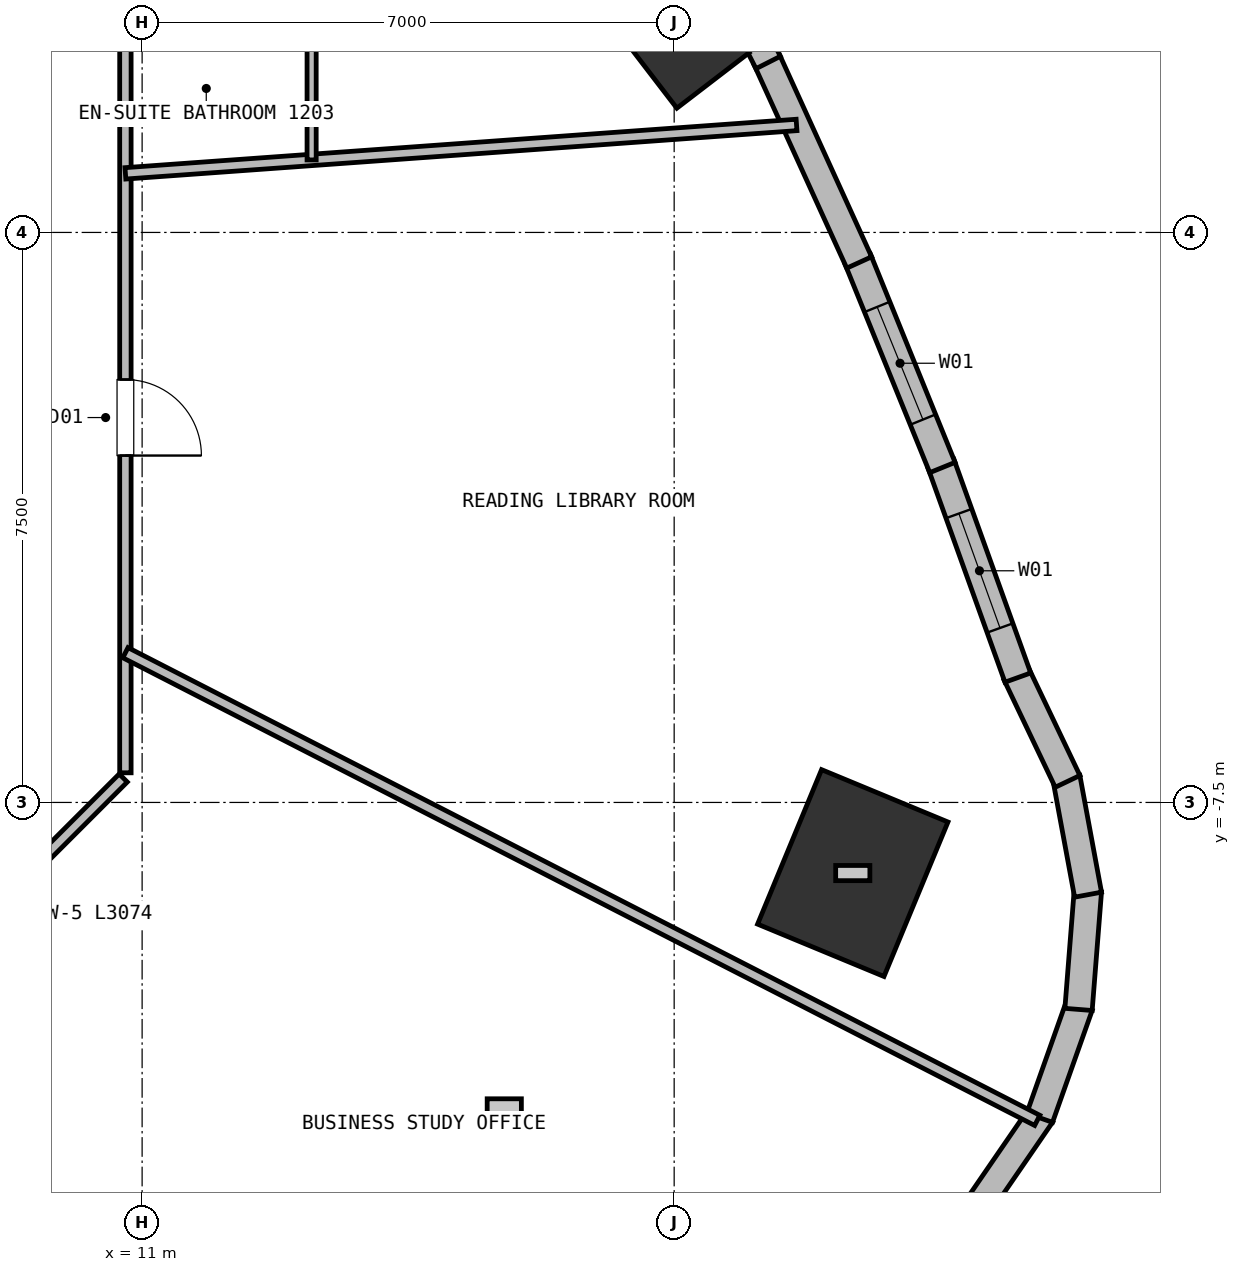
"""IFC4 building model, lengths in metres.
Left out: names, types, materials, properties, quantities, classifications, styles, units other than length and angle.
Written with IfcOpenShell. Run it as: python <this file> out.ifc"""

import sys

from ifc_helpers import new_model, si_unit, direction, frame, frame_2d, origin, origin_2d, place, context, subcontext, project, spatial, rectangle, extrude, element, fill, save


model = new_model("IFC4")
c1 = context("Model", 3, precision=1e-05, world=origin(), true_north=direction((0.0, 1.0)))
c2 = subcontext(c1, "Body", "Model", "MODEL_VIEW")
j1 = project(units=[si_unit("LENGTHUNIT", "METRE"), si_unit("PLANEANGLEUNIT", "RADIAN")], contexts=[c1])
p1 = place(None, origin())
s1 = spatial("IfcSite", under=j1, at=p1, CompositionType="ELEMENT")
p2 = place(p1, origin())
s2 = spatial("IfcBuilding", under=s1, at=p2, CompositionType="ELEMENT")
p3 = place(p2, frame((0.0, 0.0, 41.75)))
s3 = spatial("IfcBuildingStorey", under=s2, at=p3, CompositionType="ELEMENT", Elevation=41.75)
p4 = place(p3, frame((20.35, -8.429, 0.0), z_axis=(0.0, 0.0, 1.0), x_axis=(-0.923879532511, 0.382683432365, 0.0)))
e1 = element("IfcColumn", 1, at=p4, inside=s3, PredefinedType="COLUMN", context=c2, shape_type="SweptSolid", body=[
    extrude(rectangle(XDim=1.8, YDim=2.2, at=origin_2d()), origin(), (0.0, 0.0, 1.0), 3.75),
])
p5 = place(p3, frame((18.207, 2.397, 0.0), z_axis=(0.0, 0.0, 1.0), x_axis=(-0.608761429009, 0.793353340291, 0.0)))
e2 = element("IfcColumn", 2, at=p5, inside=s3, PredefinedType="COLUMN", context=c2, shape_type="SweptSolid", body=[
    extrude(rectangle(XDim=1.0, YDim=1.2, at=origin_2d()), origin(), (0.0, 0.0, 1.0), 3.75),
])
for number, where, z_axis, x_axis in (
    (3, (22.831, -11.605, 0.0), (0.0, 0.0, 1.0), (-0.566, -0.824, 0.0)),
    (4, (23.331, -10.175, 0.0), (0.0, 0.0, 1.0), (-0.334, -0.943, 0.0)),
    (5, (23.443, -8.664, 0.0), (0.0, 0.0, 1.0), (-0.079, -0.997, 0.0)),
):
    element("IfcWall", number, at=place(p3, frame(where, z_axis=z_axis, x_axis=x_axis)), inside=s3, PredefinedType="SOLIDWALL", context=c2, shape_type="SweptSolid", body=[
        extrude(rectangle(XDim=1.564, YDim=0.36, at=frame_2d((0.782, 0.0))), origin(), (0.0, 0.0, 1.0), 3.5),
    ])
p6 = place(p3, frame((23.16, -7.176, 0.0), z_axis=(0.0, 0.0, 1.0), x_axis=(0.182318428527, -0.983239538779, 0.0)))
e6 = element("IfcWall", 6, at=p6, inside=s3, PredefinedType="SOLIDWALL", context=c2, shape_type="SweptSolid", body=[
    extrude(rectangle(XDim=1.564, YDim=0.36, at=frame_2d((0.782, 0.0))), origin(), (0.0, 0.0, 1.0), 3.5),
])
p7 = place(p3, frame((22.502, -5.811, 0.0), z_axis=(0.0, 0.0, 1.0), x_axis=(0.430466656099, -0.902606480138, 0.0)))
e7 = element("IfcWall", 7, at=p7, inside=s3, PredefinedType="SOLIDWALL", context=c2, shape_type="SweptSolid", body=[
    extrude(rectangle(XDim=1.564, YDim=0.36, at=frame_2d((0.782, 0.0))), origin(), (0.0, 0.0, 1.0), 3.5),
])
p8 = place(p3, frame((21.511, -3.046, 0.0), z_axis=(0.0, 0.0, 1.0), x_axis=(0.338236051909, -0.941061301504, 0.0)))
e8 = element("IfcWall", 8, at=p8, inside=s3, PredefinedType="SOLIDWALL", context=c2, shape_type="SweptSolid", body=[
    extrude(rectangle(XDim=2.987, YDim=0.36, at=frame_2d((1.493, 0.0))), origin(), (0.0, 0.0, 1.0), 3.5),
])
p9 = place(p8, frame((0.694, 0.0, 0.72)))
e9 = element("IfcOpeningElement", 9, at=p9, cuts=e8, PredefinedType="OPENING", context=c2, shape_type="SweptSolid", body=[
    extrude(rectangle(XDim=1.6, YDim=1.88, at=frame_2d((0.8, 0.94))), frame((0.0, 0.19, 0.0), z_axis=(0.0, -1.0, 0.0), x_axis=(1.0, 0.0, 0.0)), (0.0, 0.0, 1.0), 0.38),
])
p10 = place(p3, frame((20.415, -0.349, 0.0), z_axis=(0.0, 0.0, 1.0), x_axis=(0.376416849552, -0.926450406322, 0.0)))
e10 = element("IfcWall", 10, at=p10, inside=s3, PredefinedType="SOLIDWALL", context=c2, shape_type="SweptSolid", body=[
    extrude(rectangle(XDim=2.961, YDim=0.36, at=frame_2d((1.481, 0.0))), origin(), (0.0, 0.0, 1.0), 3.5),
])
p11 = place(p10, frame((0.681, 0.0, 0.72)))
e11 = element("IfcOpeningElement", 11, at=p11, cuts=e10, PredefinedType="OPENING", context=c2, shape_type="SweptSolid", body=[
    extrude(rectangle(XDim=1.6, YDim=1.88, at=frame_2d((0.8, 0.94))), frame((0.0, 0.19, 0.0), z_axis=(0.0, -1.0, 0.0), x_axis=(1.0, 0.0, 0.0)), (0.0, 0.0, 1.0), 0.38),
])
p12 = place(p3, frame((19.215, 2.281, 0.0), z_axis=(0.0, 0.0, 1.0), x_axis=(0.414578361646, -0.910013616412, 0.0)))
e12 = element("IfcWall", 12, at=p12, inside=s3, PredefinedType="SOLIDWALL", context=c2, shape_type="SweptSolid", body=[
    extrude(rectangle(XDim=2.941, YDim=0.36, at=frame_2d((1.47, 0.0))), origin(), (0.0, 0.0, 1.0), 3.5),
])
p13 = place(p3, frame((17.914, 4.845, 0.0), z_axis=(0.0, 0.0, 1.0), x_axis=(0.452380947907, -0.891824802285, 0.0)))
e13 = element("IfcWall", 13, at=p13, inside=s3, PredefinedType="SOLIDWALL", context=c2, shape_type="SweptSolid", body=[
    extrude(rectangle(XDim=2.925, YDim=0.36, at=frame_2d((1.462, 0.0))), origin(), (0.0, 0.0, 1.0), 3.5),
])
p14 = place(p3, frame((10.752, -7.178, 0.0), z_axis=(0.0, 0.0, 1.0), x_axis=(-0.707067066127, -0.707146494016, 0.0)))
e14 = element("IfcWall", 14, at=p14, inside=s3, PredefinedType="PARTITIONING", context=c2, shape_type="SweptSolid", body=[
    extrude(rectangle(XDim=3.074, YDim=0.15, at=frame_2d((1.537, 0.0))), origin(), (0.0, 0.0, 1.0), 3.12),
])
p15 = place(p3, frame((10.78, 7.11, 0.0), z_axis=(0.0, 0.0, 1.0), x_axis=(0.0, -1.0, 0.0)))
e15 = element("IfcWall", 15, at=p15, inside=s3, PredefinedType="PARTITIONING", context=c2, shape_type="SweptSolid", body=[
    extrude(rectangle(XDim=14.22, YDim=0.15, at=frame_2d((7.11, 0.0))), origin(), (0.0, 0.0, 1.0), 3.12),
])
p16 = place(p15, frame((1.159, 0.0, 0.0)))
e16 = element("IfcOpeningElement", 16, at=p16, cuts=e15, PredefinedType="OPENING", context=c2, shape_type="SweptSolid", body=[
    extrude(rectangle(XDim=1.0, YDim=2.15, at=frame_2d((0.5, 1.075))), frame((0.0, 0.085, 0.0), z_axis=(0.0, -1.0, 0.0), x_axis=(1.0, 0.0, 0.0)), (0.0, 0.0, 1.0), 0.17),
])
p17 = place(p15, frame((9.046, 0.0, 0.0)))
e17 = element("IfcOpeningElement", 17, at=p17, cuts=e15, PredefinedType="OPENING", context=c2, shape_type="SweptSolid", body=[
    extrude(rectangle(XDim=1.0, YDim=2.15, at=frame_2d((0.5, 1.075))), frame((0.0, 0.085, 0.0), z_axis=(0.0, -1.0, 0.0), x_axis=(1.0, 0.0, 0.0)), (0.0, 0.0, 1.0), 0.17),
])
p18 = place(p3, frame((10.78, -5.53, 0.0), z_axis=(0.0, 0.0, 1.0), x_axis=(0.889773346048, -0.456402665048, 0.0)))
e18 = element("IfcWall", 18, at=p18, inside=s3, PredefinedType="PARTITIONING", context=c2, shape_type="SweptSolid", body=[
    extrude(rectangle(XDim=13.483, YDim=0.15, at=frame_2d((6.742, 0.0))), origin(), (0.0, 0.0, 1.0), 3.5),
])
p19 = place(p3, frame((10.78, 0.777, 0.0), z_axis=(0.0, 0.0, 1.0), x_axis=(0.997408338359, 0.071948638431, 0.0)))
e19 = element("IfcWall", 19, at=p19, inside=s3, PredefinedType="PARTITIONING", context=c2, shape_type="SweptSolid", body=[
    extrude(rectangle(XDim=8.853, YDim=0.15, at=frame_2d((4.427, 0.0))), origin(), (0.0, 0.0, 1.0), 2.93),
])
p20 = place(p3, frame((13.23, 4.995, 0.0), z_axis=(0.0, 0.0, 1.0), x_axis=(0.0, -1.0, 0.0)))
e20 = element("IfcWall", 20, at=p20, inside=s3, PredefinedType="PARTITIONING", context=c2, shape_type="SweptSolid", body=[
    extrude(rectangle(XDim=4.041, YDim=0.12, at=frame_2d((2.021, 0.0))), origin(), (0.0, 0.0, 1.0), 3.5),
])
p21 = place(p20, frame((1.561, 0.0, 0.0)))
e21 = element("IfcOpeningElement", 21, at=p21, cuts=e20, PredefinedType="OPENING", context=c2, shape_type="SweptSolid", body=[
    extrude(rectangle(XDim=0.92, YDim=2.1, at=frame_2d((0.46, 1.05))), frame((0.0, 0.07, 0.0), z_axis=(0.0, -1.0, 0.0), x_axis=(1.0, 0.0, 0.0)), (0.0, 0.0, 1.0), 0.14),
])
p22 = place(p9, origin())
e22 = element("IfcWindow", 22, at=p22, inside=s3, PartitioningType="SINGLE_PANEL", PredefinedType="WINDOW", context=c2, shape_type="SweptSolid", body=[
    extrude(rectangle(XDim=1.6, YDim=1.88, at=frame_2d((0.8, 0.94))), frame((0.0, 0.03, 0.0), z_axis=(0.0, -1.0, 0.0), x_axis=(1.0, 0.0, 0.0)), (0.0, 0.0, 1.0), 0.06),
])
fill(e9, e22)
p23 = place(p11, origin())
e23 = element("IfcWindow", 23, at=p23, inside=s3, PartitioningType="SINGLE_PANEL", PredefinedType="WINDOW", context=c2, shape_type="SweptSolid", body=[
    extrude(rectangle(XDim=1.6, YDim=1.88, at=frame_2d((0.8, 0.94))), frame((0.0, 0.03, 0.0), z_axis=(0.0, -1.0, 0.0), x_axis=(1.0, 0.0, 0.0)), (0.0, 0.0, 1.0), 0.06),
])
fill(e11, e23)
p24 = place(p17, origin())
e24 = element("IfcDoor", 24, at=p24, inside=s3, OperationType="SINGLE_SWING_RIGHT", PredefinedType="DOOR", context=c2, shape_type="SweptSolid", body=[
    extrude(rectangle(XDim=1.0, YDim=2.15, at=frame_2d((0.5, 1.075))), frame((0.0, 0.025, 0.0), z_axis=(0.0, -1.0, 0.0), x_axis=(1.0, 0.0, 0.0)), (0.0, 0.0, 1.0), 0.05),
])
fill(e17, e24)
save(model, sys.argv[1])
